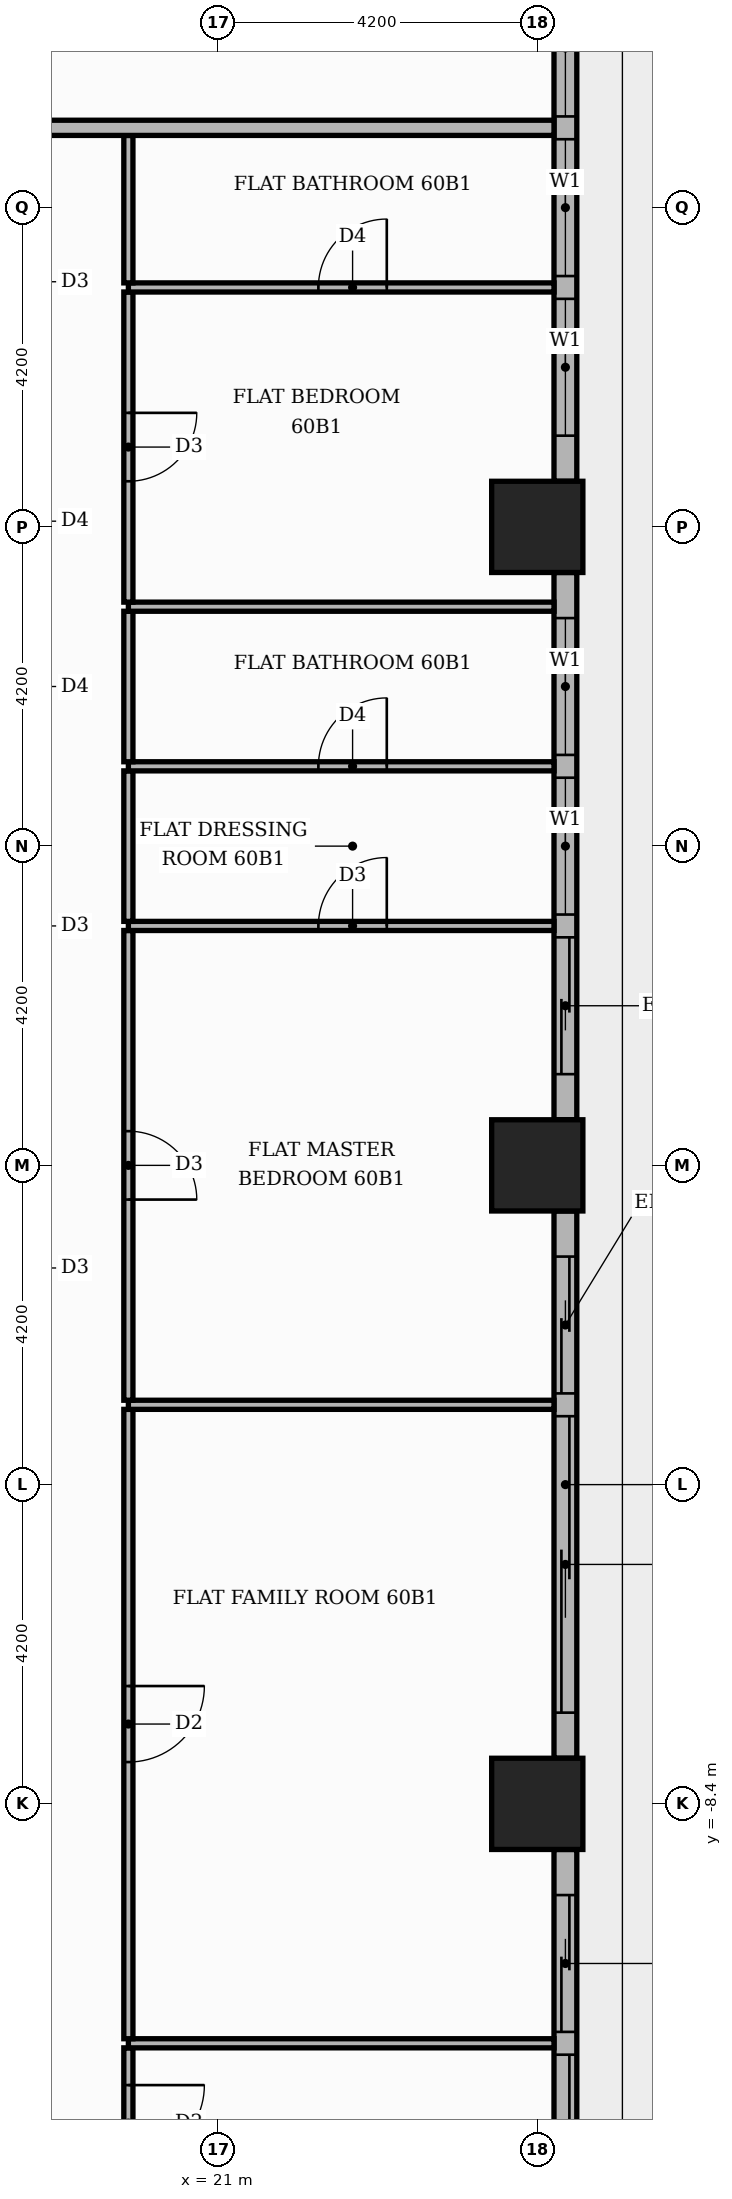
"""IFC4 building model, lengths in metres.
Left out: names, types, materials, properties, quantities, classifications, styles, units other than length and angle.
Written with IfcOpenShell. Run it as: python <this file> out.ifc"""

import sys

from ifc_helpers import new_model, si_unit, direction, frame, frame_2d, origin, origin_2d, place, context, subcontext, project, spatial, rectangle, extrude, element, fill, save


model = new_model("IFC4")
c1 = context("Model", 3, precision=1e-05, world=origin(), true_north=direction((0.0, 1.0)))
c2 = subcontext(c1, "Body", "Model", "MODEL_VIEW")
j1 = project(units=[si_unit("LENGTHUNIT", "METRE"), si_unit("PLANEANGLEUNIT", "RADIAN")], contexts=[c1])
p1 = place(None, origin())
s1 = spatial("IfcSite", under=j1, at=p1, CompositionType="ELEMENT")
p2 = place(p1, origin())
s2 = spatial("IfcBuilding", under=s1, at=p2, CompositionType="ELEMENT")
p3 = place(p2, frame((0.0, 0.0, 252.3)))
s3 = spatial("IfcBuildingStorey", under=s2, at=p3, CompositionType="ELEMENT", Elevation=252.3)
for number, where, z_axis, x_axis in (
    (1, (25.2, 0.0, 0.0), (0.0, 0.0, 1.0), (1.0, 0.0, 0.0)),
    (2, (25.2, 8.4, 0.0), (0.0, 0.0, 1.0), (1.0, 0.0, 0.0)),
    (3, (25.2, -8.4, 0.0), (0.0, 0.0, 1.0), (1.0, 0.0, 0.0)),
):
    element("IfcColumn", number, at=place(p3, frame(where, z_axis=z_axis, x_axis=x_axis)), inside=s3, PredefinedType="COLUMN", context=c2, shape_type="SweptSolid", body=[
        extrude(rectangle(XDim=1.2, YDim=1.2, at=origin_2d()), origin(), (0.0, 0.0, 1.0), 3.9),
    ])
p4 = place(p3, frame((25.57, -16.2, 0.0), z_axis=(0.0, 0.0, 1.0), x_axis=(0.0, 1.0, 0.0)))
e4 = element("IfcWall", 4, at=p4, inside=s3, PredefinedType="STANDARD", context=c2, shape_type="SweptSolid", body=[
    extrude(rectangle(XDim=7.2, YDim=0.3, at=frame_2d((3.6, 0.0))), origin(), (0.0, 0.0, 1.0), 3.48),
])
p5 = place(p4, frame((0.6, 0.0, 0.0)))
e5 = element("IfcOpeningElement", 5, at=p5, cuts=e4, PredefinedType="OPENING", context=c2, shape_type="SweptSolid", body=[
    extrude(rectangle(XDim=3.9, YDim=2.4, at=frame_2d((1.95, 1.2))), frame((0.0, 0.16, 0.0), z_axis=(0.0, -1.0, 0.0), x_axis=(1.0, 0.0, 0.0)), (0.0, 0.0, 1.0), 0.32),
])
p6 = place(p4, frame((4.8, 0.0, 0.0)))
e6 = element("IfcOpeningElement", 6, at=p6, cuts=e4, PredefinedType="OPENING", context=c2, shape_type="SweptSolid", body=[
    extrude(rectangle(XDim=1.8, YDim=2.4, at=frame_2d((0.9, 1.2))), frame((0.0, 0.16, 0.0), z_axis=(0.0, -1.0, 0.0), x_axis=(1.0, 0.0, 0.0)), (0.0, 0.0, 1.0), 0.32),
])
p7 = place(p3, frame((25.57, -7.8, 0.0), z_axis=(0.0, 0.0, 1.0), x_axis=(0.0, 1.0, 0.0)))
e7 = element("IfcWall", 7, at=p7, inside=s3, PredefinedType="STANDARD", context=c2, shape_type="SweptSolid", body=[
    extrude(rectangle(XDim=7.2, YDim=0.3, at=frame_2d((3.6, 0.0))), origin(), (0.0, 0.0, 1.0), 3.48),
])
p8 = place(p7, frame((0.6, 0.0, 0.0)))
e8 = element("IfcOpeningElement", 8, at=p8, cuts=e7, PredefinedType="OPENING", context=c2, shape_type="SweptSolid", body=[
    extrude(rectangle(XDim=3.9, YDim=2.4, at=frame_2d((1.95, 1.2))), frame((0.0, 0.16, 0.0), z_axis=(0.0, -1.0, 0.0), x_axis=(1.0, 0.0, 0.0)), (0.0, 0.0, 1.0), 0.32),
])
p9 = place(p7, frame((4.8, 0.0, 0.0)))
e9 = element("IfcOpeningElement", 9, at=p9, cuts=e7, PredefinedType="OPENING", context=c2, shape_type="SweptSolid", body=[
    extrude(rectangle(XDim=1.8, YDim=2.4, at=frame_2d((0.9, 1.2))), frame((0.0, 0.16, 0.0), z_axis=(0.0, -1.0, 0.0), x_axis=(1.0, 0.0, 0.0)), (0.0, 0.0, 1.0), 0.32),
])
p10 = place(p3, frame((25.57, 0.6, 0.0), z_axis=(0.0, 0.0, 1.0), x_axis=(0.0, 1.0, 0.0)))
e10 = element("IfcWall", 10, at=p10, inside=s3, PredefinedType="STANDARD", context=c2, shape_type="SweptSolid", body=[
    extrude(rectangle(XDim=7.2, YDim=0.3, at=frame_2d((3.6, 0.0))), origin(), (0.0, 0.0, 1.0), 3.48),
])
p11 = place(p10, frame((0.6, 0.0, 0.0)))
e11 = element("IfcOpeningElement", 11, at=p11, cuts=e10, PredefinedType="OPENING", context=c2, shape_type="SweptSolid", body=[
    extrude(rectangle(XDim=1.8, YDim=2.4, at=frame_2d((0.9, 1.2))), frame((0.0, 0.16, 0.0), z_axis=(0.0, -1.0, 0.0), x_axis=(1.0, 0.0, 0.0)), (0.0, 0.0, 1.0), 0.32),
])
p12 = place(p10, frame((2.7, 0.0, 0.9)))
e12 = element("IfcOpeningElement", 12, at=p12, cuts=e10, PredefinedType="OPENING", context=c2, shape_type="SweptSolid", body=[
    extrude(rectangle(XDim=1.8, YDim=2.1, at=frame_2d((0.9, 1.05))), frame((0.0, 0.16, 0.0), z_axis=(0.0, -1.0, 0.0), x_axis=(1.0, 0.0, 0.0)), (0.0, 0.0, 1.0), 0.32),
])
p13 = place(p10, frame((4.8, 0.0, 0.9)))
e13 = element("IfcOpeningElement", 13, at=p13, cuts=e10, PredefinedType="OPENING", context=c2, shape_type="SweptSolid", body=[
    extrude(rectangle(XDim=1.8, YDim=2.1, at=frame_2d((0.9, 1.05))), frame((0.0, 0.16, 0.0), z_axis=(0.0, -1.0, 0.0), x_axis=(1.0, 0.0, 0.0)), (0.0, 0.0, 1.0), 0.32),
])
p14 = place(p3, frame((25.57, 9.0, 0.0), z_axis=(0.0, 0.0, 1.0), x_axis=(0.0, 1.0, 0.0)))
e14 = element("IfcWall", 14, at=p14, inside=s3, PredefinedType="STANDARD", context=c2, shape_type="SweptSolid", body=[
    extrude(rectangle(XDim=7.2, YDim=0.3, at=frame_2d((3.6, 0.0))), origin(), (0.0, 0.0, 1.0), 3.48),
])
p15 = place(p14, frame((0.6, 0.0, 0.9)))
e15 = element("IfcOpeningElement", 15, at=p15, cuts=e14, PredefinedType="OPENING", context=c2, shape_type="SweptSolid", body=[
    extrude(rectangle(XDim=1.8, YDim=2.1, at=frame_2d((0.9, 1.05))), frame((0.0, 0.16, 0.0), z_axis=(0.0, -1.0, 0.0), x_axis=(1.0, 0.0, 0.0)), (0.0, 0.0, 1.0), 0.32),
])
p16 = place(p14, frame((2.7, 0.0, 0.9)))
e16 = element("IfcOpeningElement", 16, at=p16, cuts=e14, PredefinedType="OPENING", context=c2, shape_type="SweptSolid", body=[
    extrude(rectangle(XDim=1.8, YDim=2.1, at=frame_2d((0.9, 1.05))), frame((0.0, 0.16, 0.0), z_axis=(0.0, -1.0, 0.0), x_axis=(1.0, 0.0, 0.0)), (0.0, 0.0, 1.0), 0.32),
])
p17 = place(p14, frame((4.8, 0.0, 0.9)))
e17 = element("IfcOpeningElement", 17, at=p17, cuts=e14, PredefinedType="OPENING", context=c2, shape_type="SweptSolid", body=[
    extrude(rectangle(XDim=1.8, YDim=2.1, at=frame_2d((0.9, 1.05))), frame((0.0, 0.16, 0.0), z_axis=(0.0, -1.0, 0.0), x_axis=(1.0, 0.0, 0.0)), (0.0, 0.0, 1.0), 0.32),
])
p18 = place(p3, frame((19.82, -13.59, 0.0), z_axis=(0.0, 0.0, 1.0), x_axis=(0.0, 1.0, 0.0)))
e18 = element("IfcWall", 18, at=p18, inside=s3, PredefinedType="PARTITIONING", context=c2, shape_type="SweptSolid", body=[
    extrude(rectangle(XDim=1.98, YDim=0.12, at=frame_2d((0.99, 0.0))), origin(), (0.0, 0.0, 1.0), 3.48),
])
p19 = place(p18, frame((0.49, 0.0, 0.0)))
e19 = element("IfcOpeningElement", 19, at=p19, cuts=e18, PredefinedType="OPENING", context=c2, shape_type="SweptSolid", body=[
    extrude(rectangle(XDim=1.0, YDim=2.1, at=frame_2d((0.5, 1.05))), frame((0.0, 0.07, 0.0), z_axis=(0.0, -1.0, 0.0), x_axis=(1.0, 0.0, 0.0)), (0.0, 0.0, 1.0), 0.14),
])
p20 = place(p3, frame((19.82, -11.55, 0.0), z_axis=(0.0, 0.0, 1.0), x_axis=(1.0, 0.0, 0.0)))
e20 = element("IfcWall", 20, at=p20, inside=s3, PredefinedType="PARTITIONING", context=c2, shape_type="SweptSolid", body=[
    extrude(rectangle(XDim=5.6, YDim=0.12, at=frame_2d((2.8, 0.0))), origin(), (0.0, 0.0, 1.0), 3.48),
])
p21 = place(p3, frame((19.82, -11.49, 0.0), z_axis=(0.0, 0.0, 1.0), x_axis=(0.0, 1.0, 0.0)))
e21 = element("IfcWall", 21, at=p21, inside=s3, PredefinedType="PARTITIONING", context=c2, shape_type="SweptSolid", body=[
    extrude(rectangle(XDim=8.28, YDim=0.12, at=frame_2d((4.14, 0.0))), origin(), (0.0, 0.0, 1.0), 3.48),
])
p22 = place(p21, frame((3.64, 0.0, 0.0)))
e22 = element("IfcOpeningElement", 22, at=p22, cuts=e21, PredefinedType="OPENING", context=c2, shape_type="SweptSolid", body=[
    extrude(rectangle(XDim=1.0, YDim=2.1, at=frame_2d((0.5, 1.05))), frame((0.0, 0.07, 0.0), z_axis=(0.0, -1.0, 0.0), x_axis=(1.0, 0.0, 0.0)), (0.0, 0.0, 1.0), 0.14),
])
p23 = place(p3, frame((19.82, -3.15, 0.0), z_axis=(0.0, 0.0, 1.0), x_axis=(1.0, 0.0, 0.0)))
e23 = element("IfcWall", 23, at=p23, inside=s3, PredefinedType="PARTITIONING", context=c2, shape_type="SweptSolid", body=[
    extrude(rectangle(XDim=5.6, YDim=0.12, at=frame_2d((2.8, 0.0))), origin(), (0.0, 0.0, 1.0), 3.48),
])
p24 = place(p3, frame((19.82, -3.09, 0.0), z_axis=(0.0, 0.0, 1.0), x_axis=(0.0, 1.0, 0.0)))
e24 = element("IfcWall", 24, at=p24, inside=s3, PredefinedType="PARTITIONING", context=c2, shape_type="SweptSolid", body=[
    extrude(rectangle(XDim=6.18, YDim=0.12, at=frame_2d((3.09, 0.0))), origin(), (0.0, 0.0, 1.0), 3.48),
])
p25 = place(p24, frame((2.64, 0.0, 0.0)))
e25 = element("IfcOpeningElement", 25, at=p25, cuts=e24, PredefinedType="OPENING", context=c2, shape_type="SweptSolid", body=[
    extrude(rectangle(XDim=0.9, YDim=2.1, at=frame_2d((0.45, 1.05))), frame((0.0, 0.07, 0.0), z_axis=(0.0, -1.0, 0.0), x_axis=(1.0, 0.0, 0.0)), (0.0, 0.0, 1.0), 0.14),
])
p26 = place(p3, frame((19.82, 3.15, 0.0), z_axis=(0.0, 0.0, 1.0), x_axis=(1.0, 0.0, 0.0)))
e26 = element("IfcWall", 26, at=p26, inside=s3, PredefinedType="PARTITIONING", context=c2, shape_type="SweptSolid", body=[
    extrude(rectangle(XDim=5.6, YDim=0.12, at=frame_2d((2.8, 0.0))), origin(), (0.0, 0.0, 1.0), 3.48),
])
p27 = place(p26, frame((2.5, 0.0, 0.0)))
e27 = element("IfcOpeningElement", 27, at=p27, cuts=e26, PredefinedType="OPENING", context=c2, shape_type="SweptSolid", body=[
    extrude(rectangle(XDim=0.9, YDim=2.1, at=frame_2d((0.45, 1.05))), frame((0.0, 0.07, 0.0), z_axis=(0.0, -1.0, 0.0), x_axis=(1.0, 0.0, 0.0)), (0.0, 0.0, 1.0), 0.14),
])
p28 = place(p3, frame((19.82, 3.21, 0.0), z_axis=(0.0, 0.0, 1.0), x_axis=(0.0, 1.0, 0.0)))
e28 = element("IfcWall", 28, at=p28, inside=s3, PredefinedType="PARTITIONING", context=c2, shape_type="SweptSolid", body=[
    extrude(rectangle(XDim=1.98, YDim=0.12, at=frame_2d((0.99, 0.0))), origin(), (0.0, 0.0, 1.0), 3.48),
])
p29 = place(p3, frame((19.82, 5.25, 0.0), z_axis=(0.0, 0.0, 1.0), x_axis=(1.0, 0.0, 0.0)))
e29 = element("IfcWall", 29, at=p29, inside=s3, PredefinedType="PARTITIONING", context=c2, shape_type="SweptSolid", body=[
    extrude(rectangle(XDim=5.6, YDim=0.12, at=frame_2d((2.8, 0.0))), origin(), (0.0, 0.0, 1.0), 3.48),
])
p30 = place(p29, frame((2.5, 0.0, 0.0)))
e30 = element("IfcOpeningElement", 30, at=p30, cuts=e29, PredefinedType="OPENING", context=c2, shape_type="SweptSolid", body=[
    extrude(rectangle(XDim=0.9, YDim=2.1, at=frame_2d((0.45, 1.05))), frame((0.0, 0.07, 0.0), z_axis=(0.0, -1.0, 0.0), x_axis=(1.0, 0.0, 0.0)), (0.0, 0.0, 1.0), 0.14),
])
p31 = place(p3, frame((19.82, 5.31, 0.0), z_axis=(0.0, 0.0, 1.0), x_axis=(0.0, 1.0, 0.0)))
e31 = element("IfcWall", 31, at=p31, inside=s3, PredefinedType="PARTITIONING", context=c2, shape_type="SweptSolid", body=[
    extrude(rectangle(XDim=1.98, YDim=0.12, at=frame_2d((0.99, 0.0))), origin(), (0.0, 0.0, 1.0), 3.48),
])
p32 = place(p3, frame((19.82, 7.35, 0.0), z_axis=(0.0, 0.0, 1.0), x_axis=(1.0, 0.0, 0.0)))
e32 = element("IfcWall", 32, at=p32, inside=s3, PredefinedType="PARTITIONING", context=c2, shape_type="SweptSolid", body=[
    extrude(rectangle(XDim=5.6, YDim=0.12, at=frame_2d((2.8, 0.0))), origin(), (0.0, 0.0, 1.0), 3.48),
])
p33 = place(p3, frame((19.82, 7.41, 0.0), z_axis=(0.0, 0.0, 1.0), x_axis=(0.0, 1.0, 0.0)))
e33 = element("IfcWall", 33, at=p33, inside=s3, PredefinedType="PARTITIONING", context=c2, shape_type="SweptSolid", body=[
    extrude(rectangle(XDim=4.08, YDim=0.12, at=frame_2d((2.04, 0.0))), origin(), (0.0, 0.0, 1.0), 3.48),
])
p34 = place(p33, frame((1.59, 0.0, 0.0)))
e34 = element("IfcOpeningElement", 34, at=p34, cuts=e33, PredefinedType="OPENING", context=c2, shape_type="SweptSolid", body=[
    extrude(rectangle(XDim=0.9, YDim=2.1, at=frame_2d((0.45, 1.05))), frame((0.0, 0.07, 0.0), z_axis=(0.0, -1.0, 0.0), x_axis=(1.0, 0.0, 0.0)), (0.0, 0.0, 1.0), 0.14),
])
p35 = place(p3, frame((19.82, 11.55, 0.0), z_axis=(0.0, 0.0, 1.0), x_axis=(1.0, 0.0, 0.0)))
e35 = element("IfcWall", 35, at=p35, inside=s3, PredefinedType="PARTITIONING", context=c2, shape_type="SweptSolid", body=[
    extrude(rectangle(XDim=5.6, YDim=0.12, at=frame_2d((2.8, 0.0))), origin(), (0.0, 0.0, 1.0), 3.48),
])
p36 = place(p35, frame((2.5, 0.0, 0.0)))
e36 = element("IfcOpeningElement", 36, at=p36, cuts=e35, PredefinedType="OPENING", context=c2, shape_type="SweptSolid", body=[
    extrude(rectangle(XDim=0.9, YDim=2.1, at=frame_2d((0.45, 1.05))), frame((0.0, 0.07, 0.0), z_axis=(0.0, -1.0, 0.0), x_axis=(1.0, 0.0, 0.0)), (0.0, 0.0, 1.0), 0.14),
])
p37 = place(p3, frame((19.82, 11.61, 0.0), z_axis=(0.0, 0.0, 1.0), x_axis=(0.0, 1.0, 0.0)))
e37 = element("IfcWall", 37, at=p37, inside=s3, PredefinedType="PARTITIONING", context=c2, shape_type="SweptSolid", body=[
    extrude(rectangle(XDim=1.94, YDim=0.12, at=frame_2d((0.97, 0.0))), origin(), (0.0, 0.0, 1.0), 3.48),
])
p38 = place(p3, frame((-13.65, 13.65, 0.0), z_axis=(0.0, 0.0, 1.0), x_axis=(1.0, 0.0, 0.0)))
e38 = element("IfcWall", 38, at=p38, inside=s3, PredefinedType="PARTITIONING", context=c2, shape_type="SweptSolid", body=[
    extrude(rectangle(XDim=39.07, YDim=0.2, at=frame_2d((19.535, 0.0))), origin(), (0.0, 0.0, 1.0), 3.48),
])
p39 = place(p38, frame((24.65, 0.0, 0.0)))
e39 = element("IfcOpeningElement", 39, at=p39, cuts=e38, PredefinedType="OPENING", context=c2, shape_type="SweptSolid", body=[
    extrude(rectangle(XDim=1.1, YDim=2.4, at=frame_2d((0.55, 1.2))), frame((0.0, 0.11, 0.0), z_axis=(0.0, -1.0, 0.0), x_axis=(1.0, 0.0, 0.0)), (0.0, 0.0, 1.0), 0.22),
])
p40 = place(p38, frame((14.15, 0.0, 0.0)))
e40 = element("IfcOpeningElement", 40, at=p40, cuts=e38, PredefinedType="OPENING", context=c2, shape_type="SweptSolid", body=[
    extrude(rectangle(XDim=1.1, YDim=2.4, at=frame_2d((0.55, 1.2))), frame((0.0, 0.11, 0.0), z_axis=(0.0, -1.0, 0.0), x_axis=(1.0, 0.0, 0.0)), (0.0, 0.0, 1.0), 0.22),
])
p41 = place(p5, origin())
e41 = element("IfcDoor", 41, at=p41, inside=s3, OperationType="SLIDING_TO_LEFT", PredefinedType="DOOR", context=c2, shape_type="SweptSolid", body=[
    extrude(rectangle(XDim=3.9, YDim=2.4, at=frame_2d((1.95, 1.2))), frame((0.0, 0.025, 0.0), z_axis=(0.0, -1.0, 0.0), x_axis=(1.0, 0.0, 0.0)), (0.0, 0.0, 1.0), 0.05),
])
fill(e5, e41)
p42 = place(p6, origin())
e42 = element("IfcDoor", 42, at=p42, inside=s3, OperationType="SLIDING_TO_RIGHT", PredefinedType="DOOR", context=c2, shape_type="SweptSolid", body=[
    extrude(rectangle(XDim=1.8, YDim=2.4, at=frame_2d((0.9, 1.2))), frame((0.0, 0.025, 0.0), z_axis=(0.0, -1.0, 0.0), x_axis=(1.0, 0.0, 0.0)), (0.0, 0.0, 1.0), 0.05),
])
fill(e6, e42)
p43 = place(p8, origin())
e43 = element("IfcDoor", 43, at=p43, inside=s3, OperationType="SLIDING_TO_LEFT", PredefinedType="DOOR", context=c2, shape_type="SweptSolid", body=[
    extrude(rectangle(XDim=3.9, YDim=2.4, at=frame_2d((1.95, 1.2))), frame((0.0, 0.025, 0.0), z_axis=(0.0, -1.0, 0.0), x_axis=(1.0, 0.0, 0.0)), (0.0, 0.0, 1.0), 0.05),
])
fill(e8, e43)
p44 = place(p9, origin())
e44 = element("IfcDoor", 44, at=p44, inside=s3, OperationType="SLIDING_TO_RIGHT", PredefinedType="DOOR", context=c2, shape_type="SweptSolid", body=[
    extrude(rectangle(XDim=1.8, YDim=2.4, at=frame_2d((0.9, 1.2))), frame((0.0, 0.025, 0.0), z_axis=(0.0, -1.0, 0.0), x_axis=(1.0, 0.0, 0.0)), (0.0, 0.0, 1.0), 0.05),
])
fill(e9, e44)
p45 = place(p11, origin())
e45 = element("IfcDoor", 45, at=p45, inside=s3, OperationType="SLIDING_TO_LEFT", PredefinedType="DOOR", context=c2, shape_type="SweptSolid", body=[
    extrude(rectangle(XDim=1.8, YDim=2.4, at=frame_2d((0.9, 1.2))), frame((0.0, 0.025, 0.0), z_axis=(0.0, -1.0, 0.0), x_axis=(1.0, 0.0, 0.0)), (0.0, 0.0, 1.0), 0.05),
])
fill(e11, e45)
p46 = place(p12, origin())
e46 = element("IfcWindow", 46, at=p46, inside=s3, PartitioningType="SINGLE_PANEL", PredefinedType="WINDOW", context=c2, shape_type="SweptSolid", body=[
    extrude(rectangle(XDim=1.8, YDim=2.1, at=frame_2d((0.9, 1.05))), frame((0.0, 0.03, 0.0), z_axis=(0.0, -1.0, 0.0), x_axis=(1.0, 0.0, 0.0)), (0.0, 0.0, 1.0), 0.06),
])
fill(e12, e46)
p47 = place(p13, origin())
e47 = element("IfcWindow", 47, at=p47, inside=s3, PartitioningType="SINGLE_PANEL", PredefinedType="WINDOW", context=c2, shape_type="SweptSolid", body=[
    extrude(rectangle(XDim=1.8, YDim=2.1, at=frame_2d((0.9, 1.05))), frame((0.0, 0.03, 0.0), z_axis=(0.0, -1.0, 0.0), x_axis=(1.0, 0.0, 0.0)), (0.0, 0.0, 1.0), 0.06),
])
fill(e13, e47)
p48 = place(p15, origin())
e48 = element("IfcWindow", 48, at=p48, inside=s3, PartitioningType="SINGLE_PANEL", PredefinedType="WINDOW", context=c2, shape_type="SweptSolid", body=[
    extrude(rectangle(XDim=1.8, YDim=2.1, at=frame_2d((0.9, 1.05))), frame((0.0, 0.03, 0.0), z_axis=(0.0, -1.0, 0.0), x_axis=(1.0, 0.0, 0.0)), (0.0, 0.0, 1.0), 0.06),
])
fill(e15, e48)
p49 = place(p16, origin())
e49 = element("IfcWindow", 49, at=p49, inside=s3, PartitioningType="SINGLE_PANEL", PredefinedType="WINDOW", context=c2, shape_type="SweptSolid", body=[
    extrude(rectangle(XDim=1.8, YDim=2.1, at=frame_2d((0.9, 1.05))), frame((0.0, 0.03, 0.0), z_axis=(0.0, -1.0, 0.0), x_axis=(1.0, 0.0, 0.0)), (0.0, 0.0, 1.0), 0.06),
])
fill(e16, e49)
p50 = place(p17, origin())
e50 = element("IfcWindow", 50, at=p50, inside=s3, PartitioningType="SINGLE_PANEL", PredefinedType="WINDOW", context=c2, shape_type="SweptSolid", body=[
    extrude(rectangle(XDim=1.8, YDim=2.1, at=frame_2d((0.9, 1.05))), frame((0.0, 0.03, 0.0), z_axis=(0.0, -1.0, 0.0), x_axis=(1.0, 0.0, 0.0)), (0.0, 0.0, 1.0), 0.06),
])
fill(e17, e50)
p51 = place(p19, frame((1.0, 0.0, 0.0), z_axis=(0.0, 0.0, 1.0), x_axis=(-1.0, 0.0, 0.0)))
e51 = element("IfcDoor", 51, at=p51, inside=s3, OperationType="SINGLE_SWING_RIGHT", PredefinedType="DOOR", context=c2, shape_type="SweptSolid", body=[
    extrude(rectangle(XDim=1.0, YDim=2.1, at=frame_2d((0.5, 1.05))), frame((0.0, 0.025, 0.0), z_axis=(0.0, -1.0, 0.0), x_axis=(1.0, 0.0, 0.0)), (0.0, 0.0, 1.0), 0.05),
])
fill(e19, e51)
p52 = place(p22, frame((1.0, 0.0, 0.0), z_axis=(0.0, 0.0, 1.0), x_axis=(-1.0, 0.0, 0.0)))
e52 = element("IfcDoor", 52, at=p52, inside=s3, OperationType="SINGLE_SWING_RIGHT", PredefinedType="DOOR", context=c2, shape_type="SweptSolid", body=[
    extrude(rectangle(XDim=1.0, YDim=2.1, at=frame_2d((0.5, 1.05))), frame((0.0, 0.025, 0.0), z_axis=(0.0, -1.0, 0.0), x_axis=(1.0, 0.0, 0.0)), (0.0, 0.0, 1.0), 0.05),
])
fill(e22, e52)
p53 = place(p25, frame((0.9, 0.0, 0.0), z_axis=(0.0, 0.0, 1.0), x_axis=(-1.0, 0.0, 0.0)))
e53 = element("IfcDoor", 53, at=p53, inside=s3, OperationType="SINGLE_SWING_LEFT", PredefinedType="DOOR", context=c2, shape_type="SweptSolid", body=[
    extrude(rectangle(XDim=0.9, YDim=2.1, at=frame_2d((0.45, 1.05))), frame((0.0, 0.025, 0.0), z_axis=(0.0, -1.0, 0.0), x_axis=(1.0, 0.0, 0.0)), (0.0, 0.0, 1.0), 0.05),
])
fill(e25, e53)
p54 = place(p27, origin())
e54 = element("IfcDoor", 54, at=p54, inside=s3, OperationType="SINGLE_SWING_RIGHT", PredefinedType="DOOR", context=c2, shape_type="SweptSolid", body=[
    extrude(rectangle(XDim=0.9, YDim=2.1, at=frame_2d((0.45, 1.05))), frame((0.0, 0.025, 0.0), z_axis=(0.0, -1.0, 0.0), x_axis=(1.0, 0.0, 0.0)), (0.0, 0.0, 1.0), 0.05),
])
fill(e27, e54)
p55 = place(p30, origin())
e55 = element("IfcDoor", 55, at=p55, inside=s3, OperationType="SINGLE_SWING_RIGHT", PredefinedType="DOOR", context=c2, shape_type="SweptSolid", body=[
    extrude(rectangle(XDim=0.9, YDim=2.1, at=frame_2d((0.45, 1.05))), frame((0.0, 0.025, 0.0), z_axis=(0.0, -1.0, 0.0), x_axis=(1.0, 0.0, 0.0)), (0.0, 0.0, 1.0), 0.05),
])
fill(e30, e55)
p56 = place(p34, frame((0.9, 0.0, 0.0), z_axis=(0.0, 0.0, 1.0), x_axis=(-1.0, 0.0, 0.0)))
e56 = element("IfcDoor", 56, at=p56, inside=s3, OperationType="SINGLE_SWING_RIGHT", PredefinedType="DOOR", context=c2, shape_type="SweptSolid", body=[
    extrude(rectangle(XDim=0.9, YDim=2.1, at=frame_2d((0.45, 1.05))), frame((0.0, 0.025, 0.0), z_axis=(0.0, -1.0, 0.0), x_axis=(1.0, 0.0, 0.0)), (0.0, 0.0, 1.0), 0.05),
])
fill(e34, e56)
p57 = place(p36, origin())
e57 = element("IfcDoor", 57, at=p57, inside=s3, OperationType="SINGLE_SWING_RIGHT", PredefinedType="DOOR", context=c2, shape_type="SweptSolid", body=[
    extrude(rectangle(XDim=0.9, YDim=2.1, at=frame_2d((0.45, 1.05))), frame((0.0, 0.025, 0.0), z_axis=(0.0, -1.0, 0.0), x_axis=(1.0, 0.0, 0.0)), (0.0, 0.0, 1.0), 0.05),
])
fill(e36, e57)
save(model, sys.argv[1])
